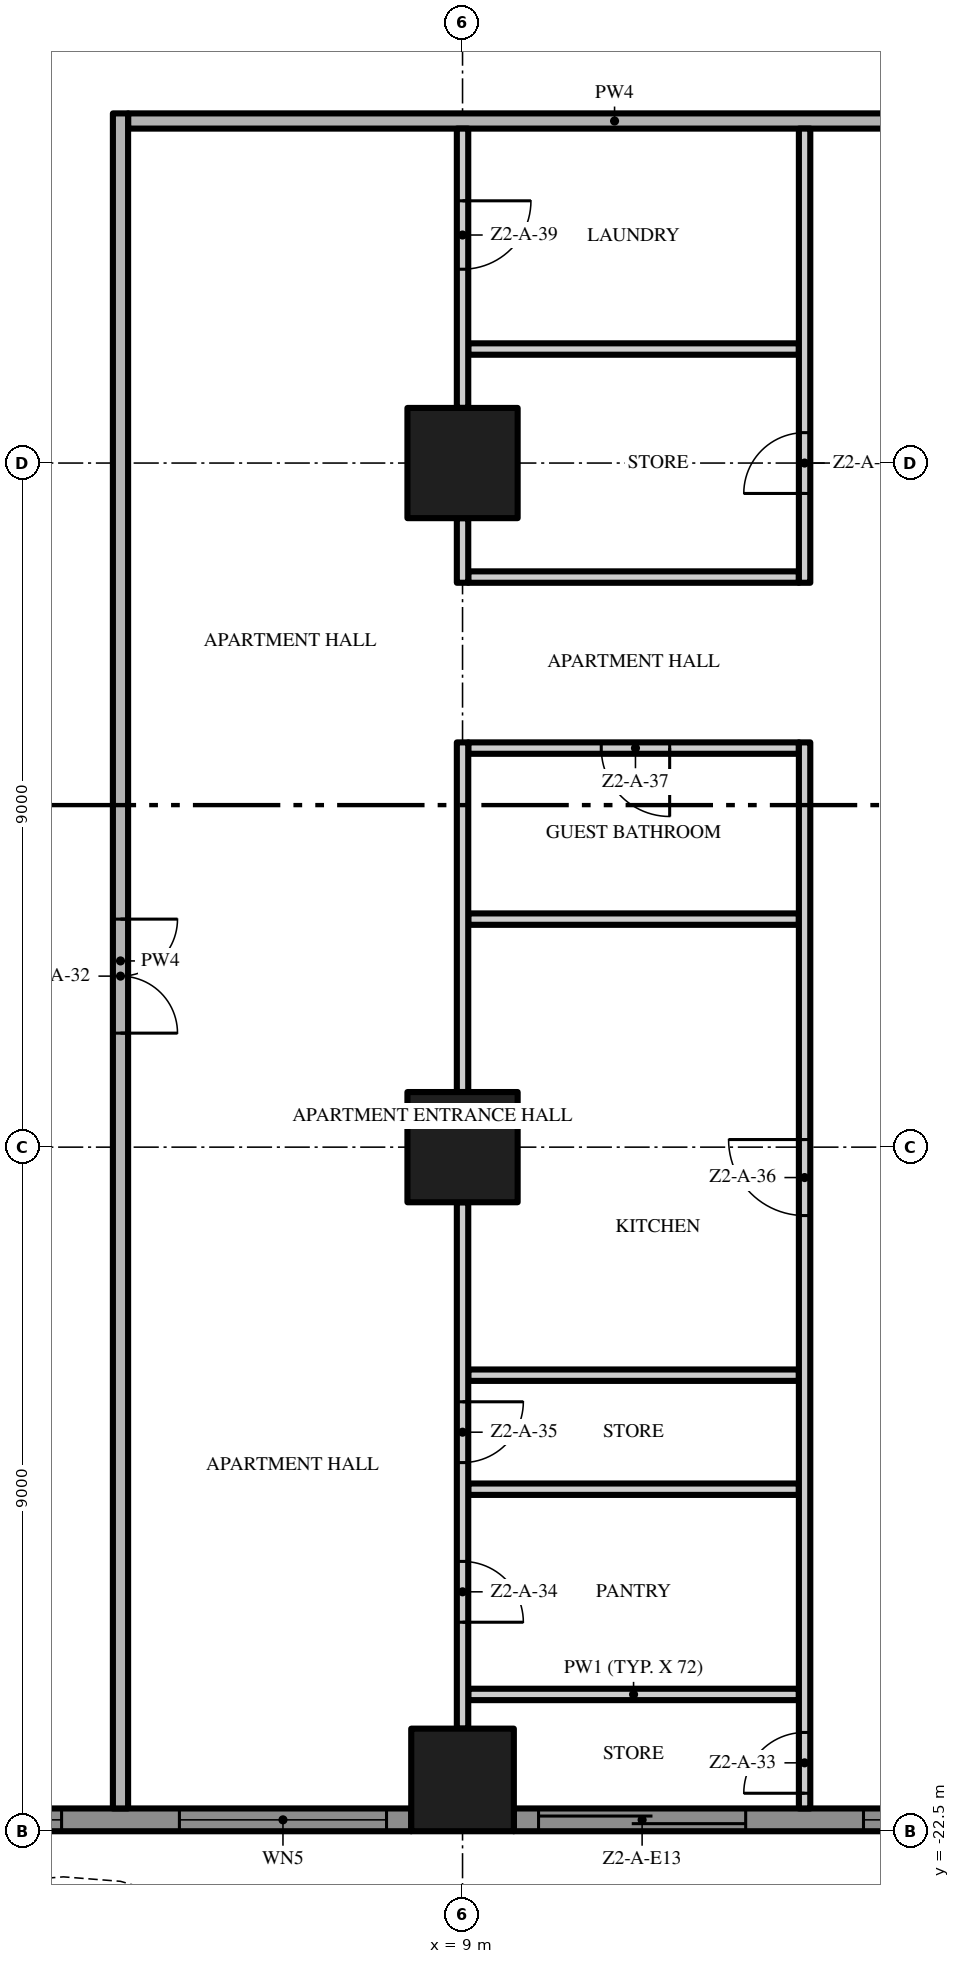
"""IFC4 building model, lengths in metres.
Left out: names, types, materials, properties, quantities, classifications, styles, units other than length and angle.
Written with IfcOpenShell. Run it as: python <this file> out.ifc"""

import sys

from ifc_helpers import new_model, si_unit, direction, frame, frame_2d, origin, origin_2d, place, context, subcontext, project, spatial, polyline, rectangle, outline, extrude, element, fill, save


model = new_model("IFC4")
c1 = context("Model", 3, precision=1e-05, world=origin(), true_north=direction((0.0, 1.0)))
c2 = subcontext(c1, "Body", "Model", "MODEL_VIEW")
j1 = project(units=[si_unit("LENGTHUNIT", "METRE"), si_unit("PLANEANGLEUNIT", "RADIAN")], contexts=[c1])
p1 = place(None, origin())
s1 = spatial("IfcSite", under=j1, at=p1, CompositionType="ELEMENT")
p2 = place(p1, origin())
s2 = spatial("IfcBuilding", under=s1, at=p2, CompositionType="ELEMENT")
p3 = place(p2, frame((0.0, 0.0, 77.0)))
s3 = spatial("IfcBuildingStorey", under=s2, at=p3, CompositionType="ELEMENT", Elevation=77.0)
p4 = place(p3, frame((9.0, -13.5, 0.0), z_axis=(0.0, 0.0, 1.0), x_axis=(1.0, 0.0, 0.0)))
e1 = element("IfcColumn", 1, at=p4, inside=s3, PredefinedType="COLUMN", context=c2, shape_type="SweptSolid", body=[
    extrude(rectangle(XDim=1.45, YDim=1.45, at=origin_2d()), origin(), (0.0, 0.0, 1.0), 3.5),
])
p5 = place(p3, frame((9.0, -21.825, 0.0), z_axis=(0.0, 0.0, 1.0), x_axis=(1.0, 0.0, 0.0)))
e2 = element("IfcColumn", 2, at=p5, inside=s3, PredefinedType="COLUMN", context=c2, shape_type="SweptSolid", body=[
    extrude(rectangle(XDim=1.35, YDim=1.35, at=origin_2d()), origin(), (0.0, 0.0, 1.0), 3.5),
])
p6 = place(p3, frame((9.0, -4.5, 0.0), z_axis=(0.0, 0.0, 1.0), x_axis=(1.0, 0.0, 0.0)))
e3 = element("IfcColumn", 3, at=p6, inside=s3, PredefinedType="COLUMN", context=c2, shape_type="SweptSolid", body=[
    extrude(rectangle(XDim=1.45, YDim=1.45, at=origin_2d()), origin(), (0.0, 0.0, 1.0), 3.5),
])
p7 = place(p3, frame((8.325, -22.35, 0.0), z_axis=(0.0, 0.0, 1.0), x_axis=(-1.0, 0.0, 0.0)))
e4 = element("IfcWall", 4, at=p7, inside=s3, PredefinedType="SOLIDWALL", context=c2, shape_type="SweptSolid", body=[
    extrude(rectangle(XDim=7.65, YDim=0.3, at=frame_2d((3.825, 0.0))), origin(), (0.0, 0.0, 1.0), 3.5),
])
p8 = place(p7, frame((4.6, 0.0, 0.45)))
e5 = element("IfcOpeningElement", 5, at=p8, cuts=e4, PredefinedType="OPENING", context=c2, shape_type="SweptSolid", body=[
    extrude(rectangle(XDim=2.725, YDim=2.65, at=frame_2d((1.363, 1.325))), frame((0.0, 0.16, 0.0), z_axis=(0.0, -1.0, 0.0), x_axis=(1.0, 0.0, 0.0)), (0.0, 0.0, 1.0), 0.32),
])
p9 = place(p7, frame((0.325, 0.0, 0.45)))
e6 = element("IfcOpeningElement", 6, at=p9, cuts=e4, PredefinedType="OPENING", context=c2, shape_type="SweptSolid", body=[
    extrude(rectangle(XDim=2.725, YDim=2.65, at=frame_2d((1.363, 1.325))), frame((0.0, 0.16, 0.0), z_axis=(0.0, -1.0, 0.0), x_axis=(1.0, 0.0, 0.0)), (0.0, 0.0, 1.0), 0.32),
])
p10 = place(p3, frame((17.325, -22.35, 0.0), z_axis=(0.0, 0.0, 1.0), x_axis=(-1.0, 0.0, 0.0)))
e7 = element("IfcWall", 7, at=p10, inside=s3, PredefinedType="SOLIDWALL", context=c2, shape_type="SweptSolid", body=[
    extrude(rectangle(XDim=7.65, YDim=0.3, at=frame_2d((3.825, 0.0))), origin(), (0.0, 0.0, 1.0), 3.5),
])
p11 = place(p10, frame((4.6, 0.0, 0.0)))
e8 = element("IfcOpeningElement", 8, at=p11, cuts=e7, PredefinedType="OPENING", context=c2, shape_type="SweptSolid", body=[
    extrude(rectangle(XDim=2.725, YDim=2.4, at=frame_2d((1.363, 1.2))), frame((0.0, 0.16, 0.0), z_axis=(0.0, -1.0, 0.0), x_axis=(1.0, 0.0, 0.0)), (0.0, 0.0, 1.0), 0.32),
])
p12 = place(p10, frame((0.325, 0.0, 0.45)))
e9 = element("IfcOpeningElement", 9, at=p12, cuts=e7, PredefinedType="OPENING", context=c2, shape_type="SweptSolid", body=[
    extrude(rectangle(XDim=2.725, YDim=2.65, at=frame_2d((1.363, 1.325))), frame((0.0, 0.16, 0.0), z_axis=(0.0, -1.0, 0.0), x_axis=(1.0, 0.0, 0.0)), (0.0, 0.0, 1.0), 0.32),
])
p13 = place(p3, origin())
e10 = element("IfcWall", 10, at=p13, inside=s3, PredefinedType="USERDEFINED", context=c2, shape_type="SweptSolid", body=[
    extrude(outline(polyline([(-22.5, -24.3), (-21.0, -25.005), (-19.5, -25.441), (-18.75, -25.5), (-18.0, -25.441), (-16.5, -25.005), (-15.0, -24.3), (-13.5, -23.595), (-12.0, -23.159), (-11.25, -23.1), (-10.5, -23.159), (-9.0, -23.595), (-7.5, -24.3), (-6.0, -25.005), (-4.5, -25.441), (-3.75, -25.5), (-3.0, -25.441), (-1.5, -25.005), (0.0, -24.3), (1.5, -23.595), (3.0, -23.159), (3.75, -23.1), (4.5, -23.159), (6.0, -23.595), (7.5, -24.3), (9.0, -25.005), (10.5, -25.441), (11.25, -25.5), (12.0, -25.441), (13.5, -25.005), (15.0, -24.3), (16.5, -23.595), (18.0, -23.159), (18.75, -23.1), (19.5, -23.159), (21.0, -23.595), (22.5, -24.3), (22.606, -24.074), (21.089, -23.36), (19.545, -22.911), (18.75, -22.849), (17.955, -22.911), (16.411, -23.36), (14.894, -24.074), (13.411, -24.771), (11.955, -25.194), (11.25, -25.249), (10.545, -25.194), (9.089, -24.771), (7.606, -24.074), (6.089, -23.36), (4.545, -22.911), (3.75, -22.849), (2.955, -22.911), (1.411, -23.36), (-0.106, -24.074), (-1.589, -24.771), (-3.045, -25.194), (-3.75, -25.249), (-4.455, -25.194), (-5.911, -24.771), (-7.394, -24.074), (-8.911, -23.36), (-10.455, -22.911), (-11.25, -22.849), (-12.045, -22.911), (-13.589, -23.36), (-15.106, -24.074), (-16.589, -24.771), (-18.045, -25.194), (-18.75, -25.249), (-19.455, -25.194), (-20.911, -24.771), (-22.394, -24.074), (-22.5, -24.3)])), origin(), (0.0, 0.0, 1.0), 0.9),
])
for number, where, z_axis, x_axis in (
    (11, (9.075, -20.7, 0.0), (0.0, 0.0, 1.0), (1.0, 0.0, 0.0)),
    (12, (9.075, -18.0, 0.0), (0.0, 0.0, 1.0), (1.0, 0.0, 0.0)),
    (13, (9.075, -16.5, 0.0), (0.0, 0.0, 1.0), (1.0, 0.0, 0.0)),
    (14, (9.075, -10.5, 0.0), (0.0, 0.0, 1.0), (1.0, 0.0, 0.0)),
):
    element("IfcWall", number, at=place(p3, frame(where, z_axis=z_axis, x_axis=x_axis)), inside=s3, PredefinedType="PARTITIONING", context=c2, shape_type="SweptSolid", body=[
        extrude(rectangle(XDim=4.35, YDim=0.15, at=frame_2d((2.175, 0.0))), origin(), (0.0, 0.0, 1.0), 3.5),
    ])
p14 = place(p3, frame((13.425, -8.25, 0.0), z_axis=(0.0, 0.0, 1.0), x_axis=(-1.0, 0.0, 0.0)))
e15 = element("IfcWall", 15, at=p14, inside=s3, PredefinedType="PARTITIONING", context=c2, shape_type="SweptSolid", body=[
    extrude(rectangle(XDim=4.35, YDim=0.15, at=frame_2d((2.175, 0.0))), origin(), (0.0, 0.0, 1.0), 3.5),
])
p15 = place(p14, frame((1.7, 0.0, 0.0)))
e16 = element("IfcOpeningElement", 16, at=p15, cuts=e15, PredefinedType="OPENING", context=c2, shape_type="SweptSolid", body=[
    extrude(rectangle(XDim=0.9, YDim=2.1, at=frame_2d((0.45, 1.05))), frame((0.0, 0.085, 0.0), z_axis=(0.0, -1.0, 0.0), x_axis=(1.0, 0.0, 0.0)), (0.0, 0.0, 1.0), 0.17),
])
for number, where, z_axis, x_axis in (
    (17, (9.075, -6.0, 0.0), (0.0, 0.0, 1.0), (1.0, 0.0, 0.0)),
    (18, (9.075, -3.0, 0.0), (0.0, 0.0, 1.0), (1.0, 0.0, 0.0)),
):
    element("IfcWall", number, at=place(p3, frame(where, z_axis=z_axis, x_axis=x_axis)), inside=s3, PredefinedType="PARTITIONING", context=c2, shape_type="SweptSolid", body=[
        extrude(rectangle(XDim=4.35, YDim=0.15, at=frame_2d((2.175, 0.0))), origin(), (0.0, 0.0, 1.0), 3.5),
    ])
p16 = place(p3, frame((4.6, 0.0, 0.0), z_axis=(0.0, 0.0, 1.0), x_axis=(1.0, 0.0, 0.0)))
e19 = element("IfcWall", 19, at=p16, inside=s3, PredefinedType="PARTITIONING", context=c2, shape_type="SweptSolid", body=[
    extrude(rectangle(XDim=12.8, YDim=0.2, at=frame_2d((6.4, 0.0))), origin(), (0.0, 0.0, 1.0), 3.5),
])
p17 = place(p3, frame((4.5, 0.1, 0.0), z_axis=(0.0, 0.0, 1.0), x_axis=(0.0, -1.0, 0.0)))
e20 = element("IfcWall", 20, at=p17, inside=s3, PredefinedType="PARTITIONING", context=c2, shape_type="SweptSolid", body=[
    extrude(rectangle(XDim=22.3, YDim=0.2, at=frame_2d((11.15, 0.0))), origin(), (0.0, 0.0, 1.0), 3.5),
])
p18 = place(p17, frame((10.6, 0.0, 0.0)))
e21 = element("IfcOpeningElement", 21, at=p18, cuts=e20, PredefinedType="OPENING", context=c2, shape_type="SweptSolid", body=[
    extrude(rectangle(XDim=1.5, YDim=2.4, at=frame_2d((0.75, 1.2))), frame((0.0, 0.11, 0.0), z_axis=(0.0, -1.0, 0.0), x_axis=(1.0, 0.0, 0.0)), (0.0, 0.0, 1.0), 0.22),
])
p19 = place(p3, frame((9.0, -14.225, 0.0), z_axis=(0.0, 0.0, 1.0), x_axis=(0.0, -1.0, 0.0)))
e22 = element("IfcWall", 22, at=p19, inside=s3, PredefinedType="PARTITIONING", context=c2, shape_type="SweptSolid", body=[
    extrude(rectangle(XDim=6.925, YDim=0.15, at=frame_2d((3.462, 0.0))), origin(), (0.0, 0.0, 1.0), 3.5),
])
p20 = place(p19, frame((4.725, 0.0, 0.0)))
e23 = element("IfcOpeningElement", 23, at=p20, cuts=e22, PredefinedType="OPENING", context=c2, shape_type="SweptSolid", body=[
    extrude(rectangle(XDim=0.8, YDim=2.0, at=frame_2d((0.4, 1.0))), frame((0.0, 0.085, 0.0), z_axis=(0.0, -1.0, 0.0), x_axis=(1.0, 0.0, 0.0)), (0.0, 0.0, 1.0), 0.17),
])
p21 = place(p19, frame((2.625, 0.0, 0.0)))
e24 = element("IfcOpeningElement", 24, at=p21, cuts=e22, PredefinedType="OPENING", context=c2, shape_type="SweptSolid", body=[
    extrude(rectangle(XDim=0.8, YDim=2.0, at=frame_2d((0.4, 1.0))), frame((0.0, 0.085, 0.0), z_axis=(0.0, -1.0, 0.0), x_axis=(1.0, 0.0, 0.0)), (0.0, 0.0, 1.0), 0.17),
])
p22 = place(p3, frame((9.0, -12.775, 0.0), z_axis=(0.0, 0.0, 1.0), x_axis=(0.0, 1.0, 0.0)))
e25 = element("IfcWall", 25, at=p22, inside=s3, PredefinedType="PARTITIONING", context=c2, shape_type="SweptSolid", body=[
    extrude(rectangle(XDim=4.6, YDim=0.15, at=frame_2d((2.3, 0.0))), origin(), (0.0, 0.0, 1.0), 3.5),
])
p23 = place(p3, frame((9.0, -6.075, 0.0), z_axis=(0.0, 0.0, 1.0), x_axis=(0.0, 1.0, 0.0)))
e26 = element("IfcWall", 26, at=p23, inside=s3, PredefinedType="PARTITIONING", context=c2, shape_type="SweptSolid", body=[
    extrude(rectangle(XDim=0.85, YDim=0.15, at=frame_2d((0.425, 0.0))), origin(), (0.0, 0.0, 1.0), 3.5),
])
p24 = place(p3, frame((9.0, -0.1, 0.0), z_axis=(0.0, 0.0, 1.0), x_axis=(0.0, -1.0, 0.0)))
e27 = element("IfcWall", 27, at=p24, inside=s3, PredefinedType="PARTITIONING", context=c2, shape_type="SweptSolid", body=[
    extrude(rectangle(XDim=3.675, YDim=0.15, at=frame_2d((1.837, 0.0))), origin(), (0.0, 0.0, 1.0), 3.5),
])
p25 = place(p24, frame((0.95, 0.0, 0.0)))
e28 = element("IfcOpeningElement", 28, at=p25, cuts=e27, PredefinedType="OPENING", context=c2, shape_type="SweptSolid", body=[
    extrude(rectangle(XDim=0.9, YDim=2.1, at=frame_2d((0.45, 1.05))), frame((0.0, 0.085, 0.0), z_axis=(0.0, -1.0, 0.0), x_axis=(1.0, 0.0, 0.0)), (0.0, 0.0, 1.0), 0.17),
])
p26 = place(p3, frame((13.5, -22.2, 0.0), z_axis=(0.0, 0.0, 1.0), x_axis=(0.0, 1.0, 0.0)))
e29 = element("IfcWall", 29, at=p26, inside=s3, PredefinedType="PARTITIONING", context=c2, shape_type="SweptSolid", body=[
    extrude(rectangle(XDim=14.025, YDim=0.15, at=frame_2d((7.013, 0.0))), origin(), (0.0, 0.0, 1.0), 3.5),
])
p27 = place(p26, frame((0.2, 0.0, 0.0)))
e30 = element("IfcOpeningElement", 30, at=p27, cuts=e29, PredefinedType="OPENING", context=c2, shape_type="SweptSolid", body=[
    extrude(rectangle(XDim=0.8, YDim=2.0, at=frame_2d((0.4, 1.0))), frame((0.0, 0.085, 0.0), z_axis=(0.0, -1.0, 0.0), x_axis=(1.0, 0.0, 0.0)), (0.0, 0.0, 1.0), 0.17),
])
p28 = place(p26, frame((7.8, 0.0, 0.0)))
e31 = element("IfcOpeningElement", 31, at=p28, cuts=e29, PredefinedType="OPENING", context=c2, shape_type="SweptSolid", body=[
    extrude(rectangle(XDim=1.0, YDim=2.4, at=frame_2d((0.5, 1.2))), frame((0.0, 0.085, 0.0), z_axis=(0.0, -1.0, 0.0), x_axis=(1.0, 0.0, 0.0)), (0.0, 0.0, 1.0), 0.17),
])
p29 = place(p3, frame((13.5, -6.075, 0.0), z_axis=(0.0, 0.0, 1.0), x_axis=(0.0, 1.0, 0.0)))
e32 = element("IfcWall", 32, at=p29, inside=s3, PredefinedType="PARTITIONING", context=c2, shape_type="SweptSolid", body=[
    extrude(rectangle(XDim=5.975, YDim=0.15, at=frame_2d((2.987, 0.0))), origin(), (0.0, 0.0, 1.0), 3.5),
])
p30 = place(p29, frame((1.175, 0.0, 0.0)))
e33 = element("IfcOpeningElement", 33, at=p30, cuts=e32, PredefinedType="OPENING", context=c2, shape_type="SweptSolid", body=[
    extrude(rectangle(XDim=0.8, YDim=2.0, at=frame_2d((0.4, 1.0))), frame((0.0, 0.085, 0.0), z_axis=(0.0, -1.0, 0.0), x_axis=(1.0, 0.0, 0.0)), (0.0, 0.0, 1.0), 0.17),
])
p31 = place(p8, origin())
e34 = element("IfcWindow", 34, at=p31, inside=s3, PartitioningType="SINGLE_PANEL", PredefinedType="WINDOW", context=c2, shape_type="SweptSolid", body=[
    extrude(rectangle(XDim=2.725, YDim=2.65, at=frame_2d((1.363, 1.325))), frame((0.0, 0.03, 0.0), z_axis=(0.0, -1.0, 0.0), x_axis=(1.0, 0.0, 0.0)), (0.0, 0.0, 1.0), 0.06),
])
fill(e5, e34)
p32 = place(p9, origin())
e35 = element("IfcWindow", 35, at=p32, inside=s3, PartitioningType="SINGLE_PANEL", PredefinedType="WINDOW", context=c2, shape_type="SweptSolid", body=[
    extrude(rectangle(XDim=2.725, YDim=2.65, at=frame_2d((1.363, 1.325))), frame((0.0, 0.03, 0.0), z_axis=(0.0, -1.0, 0.0), x_axis=(1.0, 0.0, 0.0)), (0.0, 0.0, 1.0), 0.06),
])
fill(e6, e35)
p33 = place(p11, origin())
e36 = element("IfcDoor", 36, at=p33, inside=s3, OperationType="SINGLE_SWING_LEFT", PredefinedType="DOOR", context=c2, shape_type="SweptSolid", body=[
    extrude(rectangle(XDim=2.725, YDim=2.4, at=frame_2d((1.363, 1.2))), frame((0.0, 0.025, 0.0), z_axis=(0.0, -1.0, 0.0), x_axis=(1.0, 0.0, 0.0)), (0.0, 0.0, 1.0), 0.05),
])
fill(e8, e36)
p34 = place(p12, origin())
e37 = element("IfcWindow", 37, at=p34, inside=s3, PartitioningType="SINGLE_PANEL", PredefinedType="WINDOW", context=c2, shape_type="SweptSolid", body=[
    extrude(rectangle(XDim=2.725, YDim=2.65, at=frame_2d((1.363, 1.325))), frame((0.0, 0.03, 0.0), z_axis=(0.0, -1.0, 0.0), x_axis=(1.0, 0.0, 0.0)), (0.0, 0.0, 1.0), 0.06),
])
fill(e9, e37)
p35 = place(p18, origin())
e38 = element("IfcDoor", 38, at=p35, inside=s3, OperationType="DOUBLE_DOOR_SINGLE_SWING", PredefinedType="DOOR", context=c2, shape_type="SweptSolid", body=[
    extrude(rectangle(XDim=1.5, YDim=2.4, at=frame_2d((0.75, 1.2))), frame((0.0, 0.025, 0.0), z_axis=(0.0, -1.0, 0.0), x_axis=(1.0, 0.0, 0.0)), (0.0, 0.0, 1.0), 0.05),
])
fill(e21, e38)
p36 = place(p27, origin())
e39 = element("IfcDoor", 39, at=p36, inside=s3, OperationType="SINGLE_SWING_LEFT", PredefinedType="DOOR", context=c2, shape_type="SweptSolid", body=[
    extrude(rectangle(XDim=0.8, YDim=2.0, at=frame_2d((0.4, 1.0))), frame((0.0, 0.025, 0.0), z_axis=(0.0, -1.0, 0.0), x_axis=(1.0, 0.0, 0.0)), (0.0, 0.0, 1.0), 0.05),
])
fill(e30, e39)
p37 = place(p20, origin())
e40 = element("IfcDoor", 40, at=p37, inside=s3, OperationType="SINGLE_SWING_RIGHT", PredefinedType="DOOR", context=c2, shape_type="SweptSolid", body=[
    extrude(rectangle(XDim=0.8, YDim=2.0, at=frame_2d((0.4, 1.0))), frame((0.0, 0.025, 0.0), z_axis=(0.0, -1.0, 0.0), x_axis=(1.0, 0.0, 0.0)), (0.0, 0.0, 1.0), 0.05),
])
fill(e23, e40)
p38 = place(p21, origin())
e41 = element("IfcDoor", 41, at=p38, inside=s3, OperationType="SINGLE_SWING_LEFT", PredefinedType="DOOR", context=c2, shape_type="SweptSolid", body=[
    extrude(rectangle(XDim=0.8, YDim=2.0, at=frame_2d((0.4, 1.0))), frame((0.0, 0.025, 0.0), z_axis=(0.0, -1.0, 0.0), x_axis=(1.0, 0.0, 0.0)), (0.0, 0.0, 1.0), 0.05),
])
fill(e24, e41)
p39 = place(p28, origin())
e42 = element("IfcDoor", 42, at=p39, inside=s3, OperationType="SINGLE_SWING_RIGHT", PredefinedType="DOOR", context=c2, shape_type="SweptSolid", body=[
    extrude(rectangle(XDim=1.0, YDim=2.4, at=frame_2d((0.5, 1.2))), frame((0.0, 0.025, 0.0), z_axis=(0.0, -1.0, 0.0), x_axis=(1.0, 0.0, 0.0)), (0.0, 0.0, 1.0), 0.05),
])
fill(e31, e42)
p40 = place(p15, origin())
e43 = element("IfcDoor", 43, at=p40, inside=s3, OperationType="SINGLE_SWING_LEFT", PredefinedType="DOOR", context=c2, shape_type="SweptSolid", body=[
    extrude(rectangle(XDim=0.9, YDim=2.1, at=frame_2d((0.45, 1.05))), frame((0.0, 0.025, 0.0), z_axis=(0.0, -1.0, 0.0), x_axis=(1.0, 0.0, 0.0)), (0.0, 0.0, 1.0), 0.05),
])
fill(e16, e43)
p41 = place(p30, origin())
e44 = element("IfcDoor", 44, at=p41, inside=s3, OperationType="SINGLE_SWING_LEFT", PredefinedType="DOOR", context=c2, shape_type="SweptSolid", body=[
    extrude(rectangle(XDim=0.8, YDim=2.0, at=frame_2d((0.4, 1.0))), frame((0.0, 0.025, 0.0), z_axis=(0.0, -1.0, 0.0), x_axis=(1.0, 0.0, 0.0)), (0.0, 0.0, 1.0), 0.05),
])
fill(e33, e44)
p42 = place(p25, origin())
e45 = element("IfcDoor", 45, at=p42, inside=s3, OperationType="SINGLE_SWING_LEFT", PredefinedType="DOOR", context=c2, shape_type="SweptSolid", body=[
    extrude(rectangle(XDim=0.9, YDim=2.1, at=frame_2d((0.45, 1.05))), frame((0.0, 0.025, 0.0), z_axis=(0.0, -1.0, 0.0), x_axis=(1.0, 0.0, 0.0)), (0.0, 0.0, 1.0), 0.05),
])
fill(e28, e45)
save(model, sys.argv[1])
